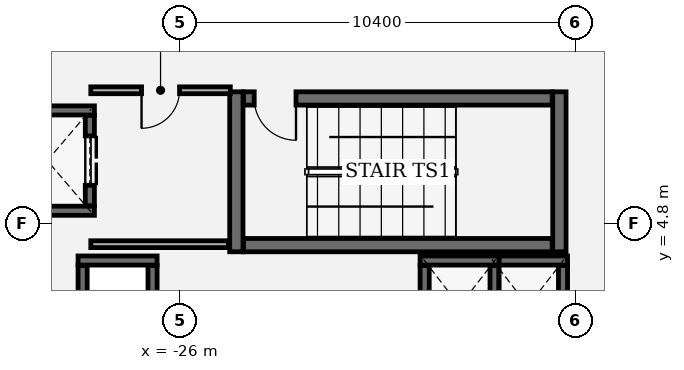
"""IFC4 building model, lengths in metres.
Left out: names, types, materials, properties, quantities, classifications, styles, units other than length and angle.
Written with IfcOpenShell. Run it as: python <this file> out.ifc"""

import sys

from ifc_helpers import new_model, si_unit, direction, frame, frame_2d, origin, place, context, subcontext, project, spatial, rectangle, extrude, element, fill, save


model = new_model("IFC4")
c1 = context("Model", 3, precision=1e-05, world=origin(), true_north=direction((0.0, 1.0)))
c2 = subcontext(c1, "Body", "Model", "MODEL_VIEW")
j1 = project(units=[si_unit("LENGTHUNIT", "METRE"), si_unit("PLANEANGLEUNIT", "RADIAN")], contexts=[c1])
p1 = place(None, origin())
s1 = spatial("IfcSite", under=j1, at=p1, CompositionType="ELEMENT")
p2 = place(p1, origin())
s2 = spatial("IfcBuilding", under=s1, at=p2, CompositionType="ELEMENT")
p3 = place(p2, frame((0.0, 0.0, 99.6)))
s3 = spatial("IfcBuildingStorey", under=s2, at=p3, CompositionType="ELEMENT", Elevation=99.6)
p4 = place(p3, frame((-61.255, 4.255, 0.0), z_axis=(0.0, 0.0, 1.0), x_axis=(0.842603619866, 0.538534251268, 0.0)))
e1 = element("IfcWall", 1, at=p4, inside=s3, PredefinedType="SOLIDWALL", context=c2, shape_type="SweptSolid", body=[
    extrude(rectangle(XDim=55.307, YDim=0.3, at=frame_2d((27.653, 0.0))), origin(), (0.0, 0.0, 1.0), 5.1),
])
for number, where, z_axis, x_axis in (
    (2, (-24.525, 8.26, 0.0), (0.0, 0.0, 1.0), (0.0, -1.0, 0.0)),
    (3, (-16.025, 4.05, 0.0), (0.0, 0.0, 1.0), (0.0, 1.0, 0.0)),
):
    element("IfcWall", number, at=place(p3, frame(where, z_axis=z_axis, x_axis=x_axis)), inside=s3, PredefinedType="SHEAR", context=c2, shape_type="SweptSolid", body=[
        extrude(rectangle(XDim=4.21, YDim=0.35, at=frame_2d((2.105, 0.0))), origin(), (0.0, 0.0, 1.0), 5.1),
    ])
p5 = place(p3, frame((-24.335, 4.225, 0.0), z_axis=(0.0, 0.0, 1.0), x_axis=(1.0, 0.0, 0.0)))
e4 = element("IfcWall", 4, at=p5, inside=s3, PredefinedType="SHEAR", context=c2, shape_type="SweptSolid", body=[
    extrude(rectangle(XDim=8.12, YDim=0.35, at=frame_2d((4.06, 0.0))), origin(), (0.0, 0.0, 1.0), 5.1),
])
p6 = place(p3, frame((-16.215, 8.085, 0.0), z_axis=(0.0, 0.0, 1.0), x_axis=(-1.0, 0.0, 0.0)))
e5 = element("IfcWall", 5, at=p6, inside=s3, PredefinedType="SHEAR", context=c2, shape_type="SweptSolid", body=[
    extrude(rectangle(XDim=8.12, YDim=0.35, at=frame_2d((4.06, 0.0))), origin(), (0.0, 0.0, 1.0), 5.1),
])
p7 = place(p6, frame((6.74, 0.0, 0.0)))
e6 = element("IfcOpeningElement", 6, at=p7, cuts=e5, PredefinedType="OPENING", context=c2, shape_type="SweptSolid", body=[
    extrude(rectangle(XDim=1.1, YDim=2.2, at=frame_2d((0.55, 1.1))), frame((0.0, 0.185, 0.0), z_axis=(0.0, -1.0, 0.0), x_axis=(1.0, 0.0, 0.0)), (0.0, 0.0, 1.0), 0.37),
])
for number, where, z_axis, x_axis in (
    (7, (-28.26, 5.13, 0.0), (0.0, 0.0, 1.0), (-1.0, 0.0, 0.0)),
    (8, (-30.74, 7.77, 0.0), (0.0, 0.0, 1.0), (1.0, 0.0, 0.0)),
):
    element("IfcWall", number, at=place(p3, frame(where, z_axis=z_axis, x_axis=x_axis)), inside=s3, PredefinedType="SHEAR", context=c2, shape_type="SweptSolid", body=[
        extrude(rectangle(XDim=2.48, YDim=0.24, at=frame_2d((1.24, 0.0))), origin(), (0.0, 0.0, 1.0), 5.1),
    ])
p8 = place(p3, frame((-28.38, 7.638, 0.0), z_axis=(0.0, 0.0, 1.0), x_axis=(0.0, -1.0, 0.0)))
e9 = element("IfcWall", 9, at=p8, inside=s3, PredefinedType="SHEAR", context=c2, shape_type="SweptSolid", body=[
    extrude(rectangle(XDim=2.376, YDim=0.24, at=frame_2d((1.188, 0.0))), origin(), (0.0, 0.0, 1.0), 5.1),
])
p9 = place(p8, frame((0.538, 0.0, 0.0)))
e10 = element("IfcOpeningElement", 10, at=p9, cuts=e9, PredefinedType="OPENING", context=c2, shape_type="SweptSolid", body=[
    extrude(rectangle(XDim=1.3, YDim=2.3, at=frame_2d((0.65, 1.15))), frame((0.0, 0.13, 0.0), z_axis=(0.0, -1.0, 0.0), x_axis=(1.0, 0.0, 0.0)), (0.0, 0.0, 1.0), 0.26),
])
p10 = place(p3, frame((-28.69, 3.82, 0.0), z_axis=(0.0, 0.0, 1.0), x_axis=(1.0, 0.0, 0.0)))
e11 = element("IfcWall", 11, at=p10, inside=s3, PredefinedType="SHEAR", context=c2, shape_type="SweptSolid", body=[
    extrude(rectangle(XDim=2.08, YDim=0.24, at=frame_2d((1.04, 0.0))), origin(), (0.0, 0.0, 1.0), 5.1),
])
for number, where, z_axis, x_axis in (
    (12, (-28.57, 1.562, 0.0), (0.0, 0.0, 1.0), (0.0, 1.0, 0.0)),
    (13, (-26.73, 3.688, 0.0), (0.0, 0.0, 1.0), (0.0, -1.0, 0.0)),
):
    element("IfcWall", number, at=place(p3, frame(where, z_axis=z_axis, x_axis=x_axis)), inside=s3, PredefinedType="SHEAR", context=c2, shape_type="SweptSolid", body=[
        extrude(rectangle(XDim=2.126, YDim=0.24, at=frame_2d((1.063, 0.0))), origin(), (0.0, 0.0, 1.0), 5.1),
    ])
p11 = place(p3, frame((-19.69, 3.82, 0.0), z_axis=(0.0, 0.0, 1.0), x_axis=(1.0, 0.0, 0.0)))
e14 = element("IfcWall", 14, at=p11, inside=s3, PredefinedType="SHEAR", context=c2, shape_type="SweptSolid", body=[
    extrude(rectangle(XDim=2.08, YDim=0.24, at=frame_2d((1.04, 0.0))), origin(), (0.0, 0.0, 1.0), 5.1),
])
for number, where, z_axis, x_axis in (
    (15, (-19.57, 1.562, 0.0), (0.0, 0.0, 1.0), (0.0, 1.0, 0.0)),
    (16, (-17.73, 3.688, 0.0), (0.0, 0.0, 1.0), (0.0, -1.0, 0.0)),
):
    element("IfcWall", number, at=place(p3, frame(where, z_axis=z_axis, x_axis=x_axis)), inside=s3, PredefinedType="SHEAR", context=c2, shape_type="SweptSolid", body=[
        extrude(rectangle(XDim=2.126, YDim=0.24, at=frame_2d((1.063, 0.0))), origin(), (0.0, 0.0, 1.0), 5.1),
    ])
p12 = place(p3, frame((-17.61, 3.82, 0.0), z_axis=(0.0, 0.0, 1.0), x_axis=(1.0, 0.0, 0.0)))
e17 = element("IfcWall", 17, at=p12, inside=s3, PredefinedType="SHEAR", context=c2, shape_type="SweptSolid", body=[
    extrude(rectangle(XDim=1.8, YDim=0.24, at=frame_2d((0.9, 0.0))), origin(), (0.0, 0.0, 1.0), 5.1),
])
p13 = place(p3, frame((-15.93, 3.688, 0.0), z_axis=(0.0, 0.0, 1.0), x_axis=(0.0, -1.0, 0.0)))
e18 = element("IfcWall", 18, at=p13, inside=s3, PredefinedType="SHEAR", context=c2, shape_type="SweptSolid", body=[
    extrude(rectangle(XDim=2.126, YDim=0.24, at=frame_2d((1.063, 0.0))), origin(), (0.0, 0.0, 1.0), 5.1),
])
p14 = place(p3, frame((-28.355, 4.25, 0.0), z_axis=(0.0, 0.0, 1.0), x_axis=(1.0, 0.0, 0.0)))
e19 = element("IfcWall", 19, at=p14, inside=s3, PredefinedType="PARTITIONING", context=c2, shape_type="SweptSolid", body=[
    extrude(rectangle(XDim=3.622, YDim=0.18, at=frame_2d((1.811, 0.0))), origin(), (0.0, 0.0, 1.0), 5.1),
])
p15 = place(p3, frame((-24.684, 8.3, 0.0), z_axis=(0.0, 0.0, 1.0), x_axis=(-1.0, 0.0, 0.0)))
e20 = element("IfcWall", 20, at=p15, inside=s3, PredefinedType="PARTITIONING", context=c2, shape_type="SweptSolid", body=[
    extrude(rectangle(XDim=3.671, YDim=0.18, at=frame_2d((1.835, 0.0))), origin(), (0.0, 0.0, 1.0), 5.1),
])
p16 = place(p15, frame((1.335, 0.0, 0.0)))
e21 = element("IfcOpeningElement", 21, at=p16, cuts=e20, PredefinedType="OPENING", context=c2, shape_type="SweptSolid", body=[
    extrude(rectangle(XDim=1.0, YDim=2.15, at=frame_2d((0.5, 1.075))), frame((0.0, 0.1, 0.0), z_axis=(0.0, -1.0, 0.0), x_axis=(1.0, 0.0, 0.0)), (0.0, 0.0, 1.0), 0.2),
])
p17 = place(p7, origin())
e22 = element("IfcDoor", 22, at=p17, inside=s3, OperationType="SINGLE_SWING_LEFT", PredefinedType="DOOR", context=c2, shape_type="SweptSolid", body=[
    extrude(rectangle(XDim=1.1, YDim=2.2, at=frame_2d((0.55, 1.1))), frame((0.0, 0.025, 0.0), z_axis=(0.0, -1.0, 0.0), x_axis=(1.0, 0.0, 0.0)), (0.0, 0.0, 1.0), 0.05),
])
fill(e6, e22)
p18 = place(p9, origin())
e23 = element("IfcDoor", 23, at=p18, inside=s3, OperationType="DOUBLE_DOOR_SLIDING", PredefinedType="DOOR", context=c2, shape_type="SweptSolid", body=[
    extrude(rectangle(XDim=1.3, YDim=2.3, at=frame_2d((0.65, 1.15))), frame((0.0, 0.025, 0.0), z_axis=(0.0, -1.0, 0.0), x_axis=(1.0, 0.0, 0.0)), (0.0, 0.0, 1.0), 0.05),
])
fill(e10, e23)
p19 = place(p16, origin())
e24 = element("IfcDoor", 24, at=p19, inside=s3, OperationType="SINGLE_SWING_RIGHT", PredefinedType="DOOR", context=c2, shape_type="SweptSolid", body=[
    extrude(rectangle(XDim=1.0, YDim=2.15, at=frame_2d((0.5, 1.075))), frame((0.0, 0.025, 0.0), z_axis=(0.0, -1.0, 0.0), x_axis=(1.0, 0.0, 0.0)), (0.0, 0.0, 1.0), 0.05),
])
fill(e21, e24)
save(model, sys.argv[1])
